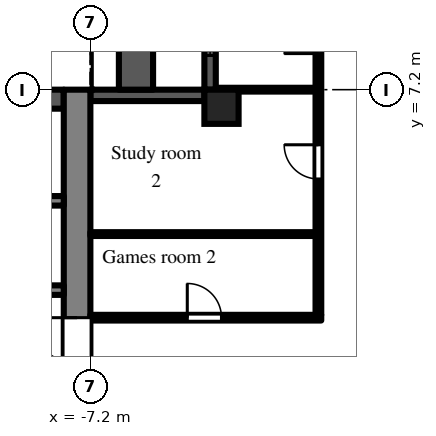
"""IFC4 building model, lengths in metres.
Left out: names, types, materials, properties, quantities, classifications, styles, units other than length and angle.
Written with IfcOpenShell. Run it as: python <this file> out.ifc"""

import sys

from ifc_helpers import new_model, si_unit, direction, frame, frame_2d, origin, origin_2d, place, context, subcontext, project, spatial, rectangle, extrude, element, fill, save


model = new_model("IFC4")
c1 = context("Model", 3, precision=1e-05, world=origin(), true_north=direction((0.0, 1.0)))
c2 = subcontext(c1, "Body", "Model", "MODEL_VIEW")
j1 = project(units=[si_unit("LENGTHUNIT", "METRE"), si_unit("PLANEANGLEUNIT", "RADIAN")], contexts=[c1])
p1 = place(None, origin())
s1 = spatial("IfcSite", under=j1, at=p1, CompositionType="ELEMENT")
p2 = place(p1, origin())
s2 = spatial("IfcBuilding", under=s1, at=p2, CompositionType="ELEMENT")
p3 = place(p2, frame((0.0, 0.0, 108.9)))
s3 = spatial("IfcBuildingStorey", under=s2, at=p3, CompositionType="ELEMENT", Elevation=108.9)
p4 = place(p3, frame((-3.75, 6.75, 0.0), z_axis=(0.0, 0.0, 1.0), x_axis=(1.0, 0.0, 0.0)))
e1 = element("IfcColumn", 1, at=p4, inside=s3, PredefinedType="COLUMN", context=c2, shape_type="SweptSolid", body=[
    extrude(rectangle(XDim=0.9, YDim=0.9, at=origin_2d()), origin(), (0.0, 0.0, 1.0), 3.0),
])
p5 = place(p3, frame((-4.05, 14.4, 0.0), z_axis=(0.0, 0.0, 1.0), x_axis=(0.0, -1.0, 0.0)))
e2 = element("IfcWall", 2, at=p5, inside=s3, PredefinedType="SOLIDWALL", context=c2, shape_type="SweptSolid", body=[
    extrude(rectangle(XDim=7.2, YDim=0.3, at=frame_2d((3.6, 0.0))), origin(), (0.0, 0.0, 1.0), 2.55),
])
p6 = place(p5, frame((3.0, 0.0, 0.0)))
e3 = element("IfcOpeningElement", 3, at=p6, cuts=e2, PredefinedType="OPENING", context=c2, shape_type="SweptSolid", body=[
    extrude(rectangle(XDim=1.2, YDim=2.05, at=frame_2d((0.6, 1.025))), frame((0.0, 0.16, 0.0), z_axis=(0.0, -1.0, 0.0), x_axis=(1.0, 0.0, 0.0)), (0.0, 0.0, 1.0), 0.32),
])
p7 = place(p5, frame((0.9, 0.0, 0.2)))
e4 = element("IfcOpeningElement", 4, at=p7, cuts=e2, PredefinedType="OPENING", context=c2, shape_type="SweptSolid", body=[
    extrude(rectangle(XDim=1.8, YDim=1.85, at=frame_2d((0.9, 0.925))), frame((0.0, 0.16, 0.0), z_axis=(0.0, -1.0, 0.0), x_axis=(1.0, 0.0, 0.0)), (0.0, 0.0, 1.0), 0.32),
])
p8 = place(p5, frame((4.5, 0.0, 0.2)))
e5 = element("IfcOpeningElement", 5, at=p8, cuts=e2, PredefinedType="OPENING", context=c2, shape_type="SweptSolid", body=[
    extrude(rectangle(XDim=1.8, YDim=1.85, at=frame_2d((0.9, 0.925))), frame((0.0, 0.16, 0.0), z_axis=(0.0, -1.0, 0.0), x_axis=(1.0, 0.0, 0.0)), (0.0, 0.0, 1.0), 0.32),
])
p9 = place(p3, frame((-4.2, 7.05, 0.0), z_axis=(0.0, 0.0, 1.0), x_axis=(-1.0, 0.0, 0.0)))
e6 = element("IfcWall", 6, at=p9, inside=s3, PredefinedType="SOLIDWALL", context=c2, shape_type="SweptSolid", body=[
    extrude(rectangle(XDim=3.0, YDim=0.3, at=frame_2d((1.5, 0.0))), origin(), (0.0, 0.0, 1.0), 2.55),
])
p10 = place(p3, frame((-6.0, 7.2, 0.0), z_axis=(0.0, 0.0, 1.0), x_axis=(0.0, 1.0, 0.0)))
e7 = element("IfcWall", 7, at=p10, inside=s3, PredefinedType="PARAPET", context=c2, shape_type="SweptSolid", body=[
    extrude(rectangle(XDim=7.2, YDim=0.9, at=frame_2d((3.6, 0.0))), origin(), (0.0, 0.0, 1.0), 0.8),
])
p11 = place(p3, frame((-7.55, -7.2, 0.0), z_axis=(0.0, 0.0, 1.0), x_axis=(0.0, 1.0, 0.0)))
e8 = element("IfcWall", 8, at=p11, inside=s3, PredefinedType="SHEAR", context=c2, shape_type="SweptSolid", body=[
    extrude(rectangle(XDim=14.4, YDim=0.7, at=frame_2d((7.2, 0.0))), origin(), (0.0, 0.0, 1.0), 2.55),
])
p12 = place(p11, frame((6.0, 0.0, 0.0)))
e9 = element("IfcOpeningElement", 9, at=p12, cuts=e8, PredefinedType="OPENING", context=c2, shape_type="SweptSolid", body=[
    extrude(rectangle(XDim=2.4, YDim=2.2, at=frame_2d((1.2, 1.1))), frame((0.0, 0.36, 0.0), z_axis=(0.0, -1.0, 0.0), x_axis=(1.0, 0.0, 0.0)), (0.0, 0.0, 1.0), 0.72),
])
p13 = place(p3, frame((-7.9, 6.95, 0.0), z_axis=(0.0, 0.0, 1.0), x_axis=(-1.0, 0.0, 0.0)))
e10 = element("IfcWall", 10, at=p13, inside=s3, PredefinedType="SHEAR", context=c2, shape_type="SweptSolid", body=[
    extrude(rectangle(XDim=12.95, YDim=0.5, at=frame_2d((6.475, 0.0))), origin(), (0.0, 0.0, 1.0), 2.55),
])
p14 = place(p3, frame((-7.9, 1.925, 0.0), z_axis=(0.0, 0.0, 1.0), x_axis=(-1.0, 0.0, 0.0)))
e11 = element("IfcWall", 11, at=p14, inside=s3, PredefinedType="SHEAR", context=c2, shape_type="SweptSolid", body=[
    extrude(rectangle(XDim=12.95, YDim=0.25, at=frame_2d((6.475, 0.0))), origin(), (0.0, 0.0, 1.0), 2.55),
])
p15 = place(p14, frame((0.525, 0.0, 0.0)))
e12 = element("IfcOpeningElement", 12, at=p15, cuts=e11, PredefinedType="OPENING", context=c2, shape_type="SweptSolid", body=[
    extrude(rectangle(XDim=0.9, YDim=2.1, at=frame_2d((0.45, 1.05))), frame((0.0, 0.135, 0.0), z_axis=(0.0, -1.0, 0.0), x_axis=(1.0, 0.0, 0.0)), (0.0, 0.0, 1.0), 0.27),
])
p16 = place(p14, frame((2.625, 0.0, 0.0)))
e13 = element("IfcOpeningElement", 13, at=p16, cuts=e11, PredefinedType="OPENING", context=c2, shape_type="SweptSolid", body=[
    extrude(rectangle(XDim=1.1, YDim=2.1, at=frame_2d((0.55, 1.05))), frame((0.0, 0.135, 0.0), z_axis=(0.0, -1.0, 0.0), x_axis=(1.0, 0.0, 0.0)), (0.0, 0.0, 1.0), 0.27),
])
p17 = place(p14, frame((4.925, 0.0, 0.0)))
e14 = element("IfcOpeningElement", 14, at=p17, cuts=e11, PredefinedType="OPENING", context=c2, shape_type="SweptSolid", body=[
    extrude(rectangle(XDim=0.9, YDim=2.1, at=frame_2d((0.45, 1.05))), frame((0.0, 0.135, 0.0), z_axis=(0.0, -1.0, 0.0), x_axis=(1.0, 0.0, 0.0)), (0.0, 0.0, 1.0), 0.27),
])
p18 = place(p14, frame((8.225, 0.0, 0.0)))
e15 = element("IfcOpeningElement", 15, at=p18, cuts=e11, PredefinedType="OPENING", context=c2, shape_type="SweptSolid", body=[
    extrude(rectangle(XDim=0.9, YDim=2.1, at=frame_2d((0.45, 1.05))), frame((0.0, 0.135, 0.0), z_axis=(0.0, -1.0, 0.0), x_axis=(1.0, 0.0, 0.0)), (0.0, 0.0, 1.0), 0.27),
])
p19 = place(p3, frame((-7.9, 4.275, 0.0), z_axis=(0.0, 0.0, 1.0), x_axis=(-1.0, 0.0, 0.0)))
e16 = element("IfcWall", 16, at=p19, inside=s3, PredefinedType="SHEAR", context=c2, shape_type="SweptSolid", body=[
    extrude(rectangle(XDim=1.95, YDim=0.25, at=frame_2d((0.975, 0.0))), origin(), (0.0, 0.0, 1.0), 2.55),
])
p20 = place(p3, frame((-7.2, 1.2, 0.0), z_axis=(0.0, 0.0, 1.0), x_axis=(1.0, 0.0, 0.0)))
e17 = element("IfcWall", 17, at=p20, inside=s3, PredefinedType="PARTITIONING", context=c2, shape_type="SweptSolid", body=[
    extrude(rectangle(XDim=6.075, YDim=0.15, at=frame_2d((3.038, 0.0))), origin(), (0.0, 0.0, 1.0), 2.55),
])
p21 = place(p20, frame((2.55, 0.0, 0.0)))
e18 = element("IfcOpeningElement", 18, at=p21, cuts=e17, PredefinedType="OPENING", context=c2, shape_type="SweptSolid", body=[
    extrude(rectangle(XDim=0.9, YDim=2.1, at=frame_2d((0.45, 1.05))), frame((0.0, 0.085, 0.0), z_axis=(0.0, -1.0, 0.0), x_axis=(1.0, 0.0, 0.0)), (0.0, 0.0, 1.0), 0.17),
])
p22 = place(p3, frame((-7.2, 3.4, 0.0), z_axis=(0.0, 0.0, 1.0), x_axis=(1.0, 0.0, 0.0)))
e19 = element("IfcWall", 19, at=p22, inside=s3, PredefinedType="PARTITIONING", context=c2, shape_type="SweptSolid", body=[
    extrude(rectangle(XDim=5.925, YDim=0.1, at=frame_2d((2.962, 0.0))), origin(), (0.0, 0.0, 1.0), 2.55),
])
p23 = place(p3, frame((-3.9, 7.2, 0.0), z_axis=(0.0, 0.0, 1.0), x_axis=(1.0, 0.0, 0.0)))
e20 = element("IfcWall", 20, at=p23, inside=s3, PredefinedType="PARTITIONING", context=c2, shape_type="SweptSolid", body=[
    extrude(rectangle(XDim=2.625, YDim=0.1, at=frame_2d((1.312, 0.0))), origin(), (0.0, 0.0, 1.0), 2.55),
])
p24 = place(p3, frame((-1.2, 1.275, 0.0), z_axis=(0.0, 0.0, 1.0), x_axis=(0.0, 1.0, 0.0)))
e21 = element("IfcWall", 21, at=p24, inside=s3, PredefinedType="PARTITIONING", context=c2, shape_type="SweptSolid", body=[
    extrude(rectangle(XDim=16.65, YDim=0.15, at=frame_2d((8.325, 0.0))), origin(), (0.0, 0.0, 1.0), 2.55),
])
p25 = place(p24, frame((3.575, 0.0, 0.0)))
e22 = element("IfcOpeningElement", 22, at=p25, cuts=e21, PredefinedType="OPENING", context=c2, shape_type="SweptSolid", body=[
    extrude(rectangle(XDim=0.9, YDim=2.1, at=frame_2d((0.45, 1.05))), frame((0.0, 0.085, 0.0), z_axis=(0.0, -1.0, 0.0), x_axis=(1.0, 0.0, 0.0)), (0.0, 0.0, 1.0), 0.17),
])
p26 = place(p24, frame((6.875, 0.0, 0.0)))
e23 = element("IfcOpeningElement", 23, at=p26, cuts=e21, PredefinedType="OPENING", context=c2, shape_type="SweptSolid", body=[
    extrude(rectangle(XDim=0.9, YDim=2.1, at=frame_2d((0.45, 1.05))), frame((0.0, 0.085, 0.0), z_axis=(0.0, -1.0, 0.0), x_axis=(1.0, 0.0, 0.0)), (0.0, 0.0, 1.0), 0.17),
])
p27 = place(p24, frame((10.475, 0.0, 0.0)))
e24 = element("IfcOpeningElement", 24, at=p27, cuts=e21, PredefinedType="OPENING", context=c2, shape_type="SweptSolid", body=[
    extrude(rectangle(XDim=0.9, YDim=2.1, at=frame_2d((0.45, 1.05))), frame((0.0, 0.085, 0.0), z_axis=(0.0, -1.0, 0.0), x_axis=(1.0, 0.0, 0.0)), (0.0, 0.0, 1.0), 0.17),
])
p28 = place(p24, frame((14.025, 0.0, 0.0)))
e25 = element("IfcOpeningElement", 25, at=p28, cuts=e21, PredefinedType="OPENING", context=c2, shape_type="SweptSolid", body=[
    extrude(rectangle(XDim=1.8, YDim=2.1, at=frame_2d((0.9, 1.05))), frame((0.0, 0.085, 0.0), z_axis=(0.0, -1.0, 0.0), x_axis=(1.0, 0.0, 0.0)), (0.0, 0.0, 1.0), 0.17),
])
p29 = place(p8, origin())
e26 = element("IfcWindow", 26, at=p29, inside=s3, PartitioningType="SINGLE_PANEL", PredefinedType="WINDOW", context=c2, shape_type="SweptSolid", body=[
    extrude(rectangle(XDim=1.8, YDim=1.85, at=frame_2d((0.9, 0.925))), frame((0.0, 0.03, 0.0), z_axis=(0.0, -1.0, 0.0), x_axis=(1.0, 0.0, 0.0)), (0.0, 0.0, 1.0), 0.06),
])
fill(e5, e26)
p30 = place(p12, origin())
e27 = element("IfcDoor", 27, at=p30, inside=s3, OperationType="DOUBLE_DOOR_DOUBLE_SWING", PredefinedType="DOOR", context=c2, shape_type="SweptSolid", body=[
    extrude(rectangle(XDim=2.4, YDim=2.2, at=frame_2d((1.2, 1.1))), frame((0.0, 0.025, 0.0), z_axis=(0.0, -1.0, 0.0), x_axis=(1.0, 0.0, 0.0)), (0.0, 0.0, 1.0), 0.05),
])
fill(e9, e27)
p31 = place(p21, origin())
e28 = element("IfcDoor", 28, at=p31, inside=s3, OperationType="SINGLE_SWING_LEFT", PredefinedType="DOOR", context=c2, shape_type="SweptSolid", body=[
    extrude(rectangle(XDim=0.9, YDim=2.1, at=frame_2d((0.45, 1.05))), frame((0.0, 0.025, 0.0), z_axis=(0.0, -1.0, 0.0), x_axis=(1.0, 0.0, 0.0)), (0.0, 0.0, 1.0), 0.05),
])
fill(e18, e28)
p32 = place(p25, origin())
e29 = element("IfcDoor", 29, at=p32, inside=s3, OperationType="SINGLE_SWING_RIGHT", PredefinedType="DOOR", context=c2, shape_type="SweptSolid", body=[
    extrude(rectangle(XDim=0.9, YDim=2.1, at=frame_2d((0.45, 1.05))), frame((0.0, 0.025, 0.0), z_axis=(0.0, -1.0, 0.0), x_axis=(1.0, 0.0, 0.0)), (0.0, 0.0, 1.0), 0.05),
])
fill(e22, e29)
p33 = place(p26, origin())
e30 = element("IfcDoor", 30, at=p33, inside=s3, OperationType="SINGLE_SWING_LEFT", PredefinedType="DOOR", context=c2, shape_type="SweptSolid", body=[
    extrude(rectangle(XDim=0.9, YDim=2.1, at=frame_2d((0.45, 1.05))), frame((0.0, 0.025, 0.0), z_axis=(0.0, -1.0, 0.0), x_axis=(1.0, 0.0, 0.0)), (0.0, 0.0, 1.0), 0.05),
])
fill(e23, e30)
save(model, sys.argv[1])
